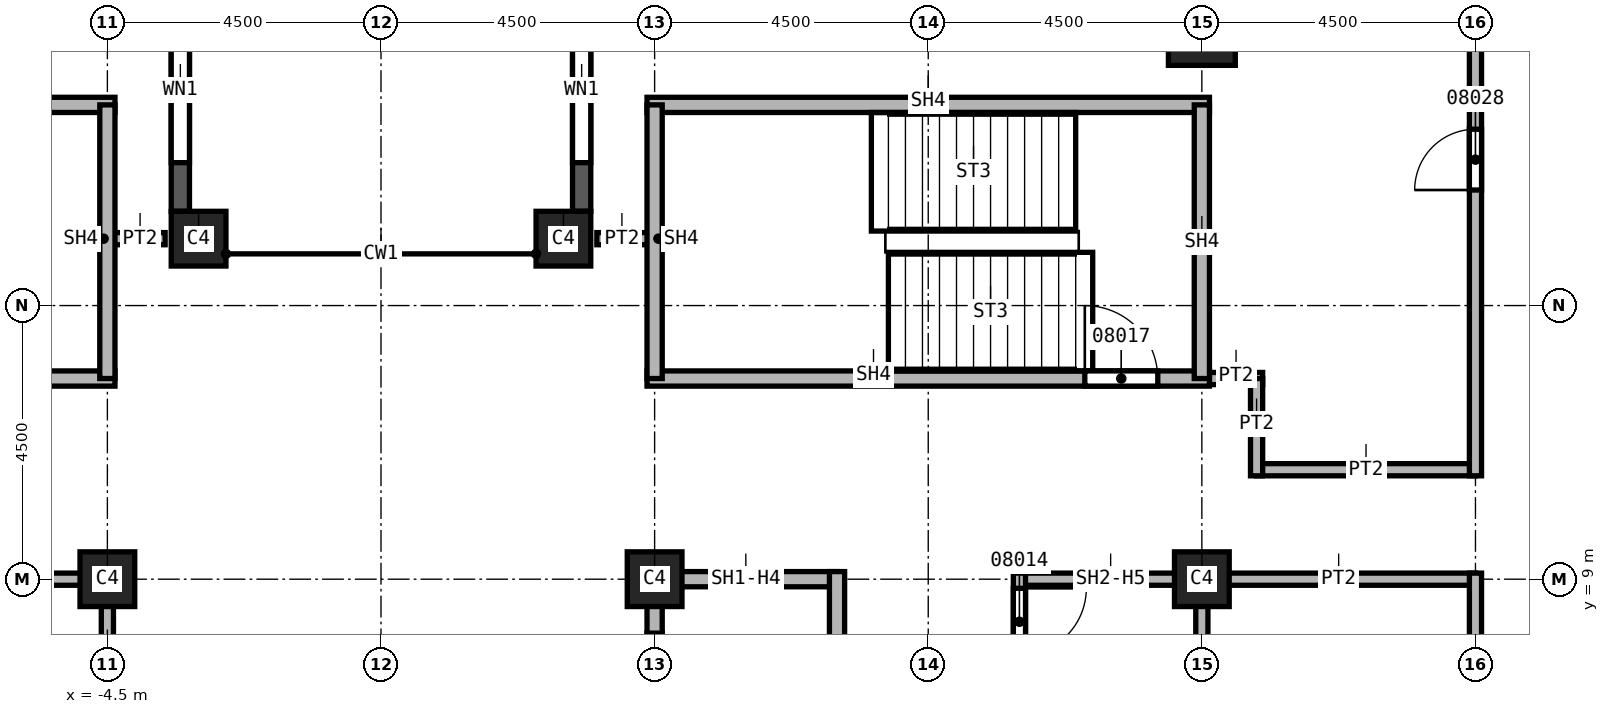
"""IFC4 building model, lengths in metres.
Left out: names, types, materials, properties, quantities, classifications, styles, units other than length and angle.
Written with IfcOpenShell. Run it as: python <this file> out.ifc"""

import sys

from ifc_helpers import new_model, si_unit, direction, frame, frame_2d, origin, origin_2d, place, context, subcontext, project, spatial, rectangle, extrude, element, fill, save


model = new_model("IFC4")
c1 = context("Model", 3, precision=1e-05, world=origin(), true_north=direction((0.0, 1.0)))
c2 = subcontext(c1, "Body", "Model", "MODEL_VIEW")
j1 = project(units=[si_unit("LENGTHUNIT", "METRE"), si_unit("PLANEANGLEUNIT", "RADIAN")], contexts=[c1])
p1 = place(None, origin())
s1 = spatial("IfcSite", under=j1, at=p1, CompositionType="ELEMENT")
p2 = place(p1, origin())
s2 = spatial("IfcBuilding", under=s1, at=p2, CompositionType="ELEMENT")
p3 = place(p2, frame((0.0, 0.0, 150.0)))
s3 = spatial("IfcBuildingStorey", under=s2, at=p3, CompositionType="ELEMENT", Elevation=150.0)
p4 = place(p3, frame((13.5, 18.0, 0.0), z_axis=(0.0, 0.0, 1.0), x_axis=(1.0, 0.0, 0.0)))
e1 = element("IfcColumn", 1, at=p4, inside=s3, PredefinedType="COLUMN", context=c2, shape_type="SweptSolid", body=[
    extrude(rectangle(XDim=1.1, YDim=1.1, at=origin_2d()), origin(), (0.0, 0.0, 1.0), 3.7),
])
for number, where, z_axis, x_axis in (
    (2, (4.5, 9.0, 0.0), (0.0, 0.0, 1.0), (1.0, 0.0, 0.0)),
    (3, (13.5, 9.0, 0.0), (0.0, 0.0, 1.0), (1.0, 0.0, 0.0)),
    (4, (-4.5, 9.0, 0.0), (0.0, 0.0, 1.0), (1.0, 0.0, 0.0)),
    (5, (3.0, 14.6, 0.0), (0.0, 0.0, 1.0), (1.0, 0.0, 0.0)),
    (6, (-3.0, 14.6, 0.0), (0.0, 0.0, 1.0), (1.0, 0.0, 0.0)),
):
    element("IfcColumn", number, at=place(p3, frame(where, z_axis=z_axis, x_axis=x_axis)), inside=s3, PredefinedType="COLUMN", context=c2, shape_type="SweptSolid", body=[
        extrude(rectangle(XDim=0.9, YDim=0.9, at=origin_2d()), origin(), (0.0, 0.0, 1.0), 3.7),
    ])
p5 = place(p3, frame((3.3, 23.05, 0.0), z_axis=(0.0, 0.0, 1.0), x_axis=(0.0, -1.0, 0.0)))
e7 = element("IfcWall", 7, at=p5, inside=s3, PredefinedType="SOLIDWALL", context=c2, shape_type="SweptSolid", body=[
    extrude(rectangle(XDim=8.0, YDim=0.3, at=frame_2d((4.0, 0.0))), origin(), (0.0, 0.0, 1.0), 3.1),
])
p6 = place(p5, frame((0.8, 0.0, 0.8)))
e8 = element("IfcOpeningElement", 8, at=p6, cuts=e7, PredefinedType="OPENING", context=c2, shape_type="SweptSolid", body=[
    extrude(rectangle(XDim=2.4, YDim=1.95, at=frame_2d((1.2, 0.975))), frame((0.0, 0.15, 0.0), z_axis=(0.0, -1.0, 0.0), x_axis=(1.0, 0.0, 0.0)), (0.0, 0.0, 1.0), 0.3),
])
p7 = place(p5, frame((4.8, 0.0, 0.8)))
e9 = element("IfcOpeningElement", 9, at=p7, cuts=e7, PredefinedType="OPENING", context=c2, shape_type="SweptSolid", body=[
    extrude(rectangle(XDim=2.4, YDim=1.95, at=frame_2d((1.2, 0.975))), frame((0.0, 0.15, 0.0), z_axis=(0.0, -1.0, 0.0), x_axis=(1.0, 0.0, 0.0)), (0.0, 0.0, 1.0), 0.3),
])
p8 = place(p3, frame((-3.3, 15.05, 0.0), z_axis=(0.0, 0.0, 1.0), x_axis=(0.0, 1.0, 0.0)))
e10 = element("IfcWall", 10, at=p8, inside=s3, PredefinedType="SOLIDWALL", context=c2, shape_type="SweptSolid", body=[
    extrude(rectangle(XDim=8.0, YDim=0.3, at=frame_2d((4.0, 0.0))), origin(), (0.0, 0.0, 1.0), 3.1),
])
p9 = place(p8, frame((0.8, 0.0, 0.8)))
e11 = element("IfcOpeningElement", 11, at=p9, cuts=e10, PredefinedType="OPENING", context=c2, shape_type="SweptSolid", body=[
    extrude(rectangle(XDim=2.4, YDim=1.95, at=frame_2d((1.2, 0.975))), frame((0.0, 0.15, 0.0), z_axis=(0.0, -1.0, 0.0), x_axis=(1.0, 0.0, 0.0)), (0.0, 0.0, 1.0), 0.3),
])
p10 = place(p8, frame((4.8, 0.0, 0.8)))
e12 = element("IfcOpeningElement", 12, at=p10, cuts=e10, PredefinedType="OPENING", context=c2, shape_type="SweptSolid", body=[
    extrude(rectangle(XDim=2.4, YDim=1.95, at=frame_2d((1.2, 0.975))), frame((0.0, 0.15, 0.0), z_axis=(0.0, -1.0, 0.0), x_axis=(1.0, 0.0, 0.0)), (0.0, 0.0, 1.0), 0.3),
])
for number, where, z_axis, x_axis in (
    (13, (-4.5, 14.6, 0.0), (0.0, 0.0, 1.0), (1.0, 0.0, 0.0)),
    (14, (3.55, 14.6, 0.0), (0.0, 0.0, 1.0), (1.0, 0.0, 0.0)),
):
    element("IfcWall", number, at=place(p3, frame(where, z_axis=z_axis, x_axis=x_axis)), inside=s3, PredefinedType="PARTITIONING", context=c2, shape_type="SweptSolid", body=[
        extrude(rectangle(XDim=0.95, YDim=0.2, at=frame_2d((0.475, 0.0))), origin(), (0.0, 0.0, 1.0), 3.7),
    ])
p11 = place(p3, frame((13.375, 12.3, 0.0), z_axis=(0.0, 0.0, 1.0), x_axis=(1.0, 0.0, 0.0)))
e15 = element("IfcWall", 15, at=p11, inside=s3, PredefinedType="PARTITIONING", context=c2, shape_type="SweptSolid", body=[
    extrude(rectangle(XDim=1.125, YDim=0.2, at=frame_2d((0.562, 0.0))), origin(), (0.0, 0.0, 1.0), 3.7),
])
p12 = place(p3, frame((18.0, 9.0, 0.0), z_axis=(0.0, 0.0, 1.0), x_axis=(-1.0, 0.0, 0.0)))
e16 = element("IfcWall", 16, at=p12, inside=s3, PredefinedType="PARTITIONING", context=c2, shape_type="SweptSolid", body=[
    extrude(rectangle(XDim=4.5, YDim=0.2, at=frame_2d((2.25, 0.0))), origin(), (0.0, 0.0, 1.0), 3.7),
])
p13 = place(p3, frame((14.4, 10.8, 0.0), z_axis=(0.0, 0.0, 1.0), x_axis=(1.0, 0.0, 0.0)))
e17 = element("IfcWall", 17, at=p13, inside=s3, PredefinedType="PARTITIONING", context=c2, shape_type="SweptSolid", body=[
    extrude(rectangle(XDim=3.6, YDim=0.2, at=frame_2d((1.8, 0.0))), origin(), (0.0, 0.0, 1.0), 3.7),
])
p14 = place(p3, frame((14.4, 12.3, 0.0), z_axis=(0.0, 0.0, 1.0), x_axis=(0.0, -1.0, 0.0)))
e18 = element("IfcWall", 18, at=p14, inside=s3, PredefinedType="PARTITIONING", context=c2, shape_type="SweptSolid", body=[
    extrude(rectangle(XDim=1.6, YDim=0.2, at=frame_2d((0.8, 0.0))), origin(), (0.0, 0.0, 1.0), 3.7),
])
p15 = place(p3, frame((18.0, -9.1, 0.0), z_axis=(0.0, 0.0, 1.0), x_axis=(0.0, 1.0, 0.0)))
e19 = element("IfcWall", 19, at=p15, inside=s3, PredefinedType="PARTITIONING", context=c2, shape_type="SweptSolid", body=[
    extrude(rectangle(XDim=18.2, YDim=0.2, at=frame_2d((9.1, 0.0))), origin(), (0.0, 0.0, 1.0), 3.7),
])
p16 = place(p15, frame((6.1, 0.0, 0.0)))
e20 = element("IfcOpeningElement", 20, at=p16, cuts=e19, PredefinedType="OPENING", context=c2, shape_type="SweptSolid", body=[
    extrude(rectangle(XDim=1.0, YDim=2.1, at=frame_2d((0.5, 1.05))), frame((0.0, 0.1, 0.0), z_axis=(0.0, -1.0, 0.0), x_axis=(1.0, 0.0, 0.0)), (0.0, 0.0, 1.0), 0.2),
])
p17 = place(p15, frame((14.2, 0.0, 0.0)))
e21 = element("IfcOpeningElement", 21, at=p17, cuts=e19, PredefinedType="OPENING", context=c2, shape_type="SweptSolid", body=[
    extrude(rectangle(XDim=1.0, YDim=2.1, at=frame_2d((0.5, 1.05))), frame((0.0, 0.1, 0.0), z_axis=(0.0, -1.0, 0.0), x_axis=(1.0, 0.0, 0.0)), (0.0, 0.0, 1.0), 0.2),
])
p18 = place(p3, frame((18.0, 10.7, 0.0), z_axis=(0.0, 0.0, 1.0), x_axis=(0.0, 1.0, 0.0)))
e22 = element("IfcWall", 22, at=p18, inside=s3, PredefinedType="PARTITIONING", context=c2, shape_type="SweptSolid", body=[
    extrude(rectangle(XDim=12.35, YDim=0.2, at=frame_2d((6.175, 0.0))), origin(), (0.0, 0.0, 1.0), 3.7),
])
p19 = place(p18, frame((4.7, 0.0, 0.0)))
e23 = element("IfcOpeningElement", 23, at=p19, cuts=e22, PredefinedType="OPENING", context=c2, shape_type="SweptSolid", body=[
    extrude(rectangle(XDim=1.0, YDim=2.1, at=frame_2d((0.5, 1.05))), frame((0.0, 0.1, 0.0), z_axis=(0.0, -1.0, 0.0), x_axis=(1.0, 0.0, 0.0)), (0.0, 0.0, 1.0), 0.2),
])
p20 = place(p3, frame((-7.5, 9.0, 0.0), z_axis=(0.0, 0.0, 1.0), x_axis=(1.0, 0.0, 0.0)))
e24 = element("IfcWall", 24, at=p20, inside=s3, PredefinedType="SOLIDWALL", context=c2, shape_type="SweptSolid", body=[
    extrude(rectangle(XDim=3.0, YDim=0.2, at=frame_2d((1.5, 0.0))), origin(), (0.0, 0.0, 1.0), 2.938),
])
p21 = place(p3, frame((-4.5, 9.1, 0.0), z_axis=(0.0, 0.0, 1.0), x_axis=(0.0, -1.0, 0.0)))
e25 = element("IfcWall", 25, at=p21, inside=s3, PredefinedType="SOLIDWALL", context=c2, shape_type="SweptSolid", body=[
    extrude(rectangle(XDim=9.1, YDim=0.2, at=frame_2d((4.55, 0.0))), origin(), (0.0, 0.0, 1.0), 2.938),
])
p22 = place(p21, frame((7.25, 0.0, 0.0)))
e26 = element("IfcOpeningElement", 26, at=p22, cuts=e25, PredefinedType="OPENING", context=c2, shape_type="SweptSolid", body=[
    extrude(rectangle(XDim=1.1, YDim=2.1, at=frame_2d((0.55, 1.05))), frame((0.0, 0.1, 0.0), z_axis=(0.0, -1.0, 0.0), x_axis=(1.0, 0.0, 0.0)), (0.0, 0.0, 1.0), 0.2),
])
p23 = place(p21, frame((2.5, 0.0, 0.0)))
e27 = element("IfcOpeningElement", 27, at=p23, cuts=e25, PredefinedType="OPENING", context=c2, shape_type="SweptSolid", body=[
    extrude(rectangle(XDim=1.1, YDim=2.1, at=frame_2d((0.55, 1.05))), frame((0.0, 0.1, 0.0), z_axis=(0.0, -1.0, 0.0), x_axis=(1.0, 0.0, 0.0)), (0.0, 0.0, 1.0), 0.2),
])
p24 = place(p3, frame((10.5, 9.0, 0.0), z_axis=(0.0, 0.0, 1.0), x_axis=(1.0, 0.0, 0.0)))
e28 = element("IfcWall", 28, at=p24, inside=s3, PredefinedType="SOLIDWALL", context=c2, shape_type="SweptSolid", body=[
    extrude(rectangle(XDim=3.1, YDim=0.2, at=frame_2d((1.55, 0.0))), origin(), (0.0, 0.0, 1.0), 2.938),
])
p25 = place(p3, frame((10.5, 9.1, 0.0), z_axis=(0.0, 0.0, 1.0), x_axis=(0.0, -1.0, 0.0)))
e29 = element("IfcWall", 29, at=p25, inside=s3, PredefinedType="SOLIDWALL", context=c2, shape_type="SweptSolid", body=[
    extrude(rectangle(XDim=3.225, YDim=0.2, at=frame_2d((1.613, 0.0))), origin(), (0.0, 0.0, 1.0), 3.7),
])
p26 = place(p25, frame((0.25, 0.0, 0.0)))
e30 = element("IfcOpeningElement", 30, at=p26, cuts=e29, PredefinedType="OPENING", context=c2, shape_type="SweptSolid", body=[
    extrude(rectangle(XDim=1.1, YDim=2.1, at=frame_2d((0.55, 1.05))), frame((0.0, 0.1, 0.0), z_axis=(0.0, -1.0, 0.0), x_axis=(1.0, 0.0, 0.0)), (0.0, 0.0, 1.0), 0.2),
])
p27 = place(p3, frame((13.5, 9.1, 0.0), z_axis=(0.0, 0.0, 1.0), x_axis=(0.0, -1.0, 0.0)))
e31 = element("IfcWall", 31, at=p27, inside=s3, PredefinedType="SOLIDWALL", context=c2, shape_type="SweptSolid", body=[
    extrude(rectangle(XDim=3.1, YDim=0.2, at=frame_2d((1.55, 0.0))), origin(), (0.0, 0.0, 1.0), 2.938),
])
p28 = place(p3, frame((4.5, 0.0, 0.0), z_axis=(0.0, 0.0, 1.0), x_axis=(0.0, 1.0, 0.0)))
e32 = element("IfcWall", 32, at=p28, inside=s3, PredefinedType="SOLIDWALL", context=c2, shape_type="SweptSolid", body=[
    extrude(rectangle(XDim=9.125, YDim=0.25, at=frame_2d((4.562, 0.0))), origin(), (0.0, 0.0, 1.0), 2.938),
])
p29 = place(p28, frame((0.95, 0.0, 0.0)))
e33 = element("IfcOpeningElement", 33, at=p29, cuts=e32, PredefinedType="OPENING", context=c2, shape_type="SweptSolid", body=[
    extrude(rectangle(XDim=1.1, YDim=2.1, at=frame_2d((0.55, 1.05))), frame((0.0, 0.125, 0.0), z_axis=(0.0, -1.0, 0.0), x_axis=(1.0, 0.0, 0.0)), (0.0, 0.0, 1.0), 0.25),
])
p30 = place(p28, frame((3.95, 0.0, 0.0)))
e34 = element("IfcOpeningElement", 34, at=p30, cuts=e32, PredefinedType="OPENING", context=c2, shape_type="SweptSolid", body=[
    extrude(rectangle(XDim=1.1, YDim=2.1, at=frame_2d((0.55, 1.05))), frame((0.0, 0.125, 0.0), z_axis=(0.0, -1.0, 0.0), x_axis=(1.0, 0.0, 0.0)), (0.0, 0.0, 1.0), 0.25),
])
p31 = place(p28, frame((7.012, 0.0, 0.0)))
e35 = element("IfcOpeningElement", 35, at=p31, cuts=e32, PredefinedType="OPENING", context=c2, shape_type="SweptSolid", body=[
    extrude(rectangle(XDim=1.1, YDim=2.1, at=frame_2d((0.55, 1.05))), frame((0.0, 0.125, 0.0), z_axis=(0.0, -1.0, 0.0), x_axis=(1.0, 0.0, 0.0)), (0.0, 0.0, 1.0), 0.25),
])
p32 = place(p3, frame((4.5, 9.0, 0.0), z_axis=(0.0, 0.0, 1.0), x_axis=(1.0, 0.0, 0.0)))
e36 = element("IfcWall", 36, at=p32, inside=s3, PredefinedType="SOLIDWALL", context=c2, shape_type="SweptSolid", body=[
    extrude(rectangle(XDim=3.0, YDim=0.25, at=frame_2d((1.5, 0.0))), origin(), (0.0, 0.0, 1.0), 2.938),
])
p33 = place(p3, frame((7.5, 9.125, 0.0), z_axis=(0.0, 0.0, 1.0), x_axis=(0.0, -1.0, 0.0)))
e37 = element("IfcWall", 37, at=p33, inside=s3, PredefinedType="SOLIDWALL", context=c2, shape_type="SweptSolid", body=[
    extrude(rectangle(XDim=12.25, YDim=0.25, at=frame_2d((6.125, 0.0))), origin(), (0.0, 0.0, 1.0), 3.7),
])
p34 = place(p3, frame((-13.625, 12.3, 0.0), z_axis=(0.0, 0.0, 1.0), x_axis=(1.0, 0.0, 0.0)))
e38 = element("IfcWall", 38, at=p34, inside=s3, PredefinedType="SOLIDWALL", context=c2, shape_type="SweptSolid", body=[
    extrude(rectangle(XDim=9.25, YDim=0.25, at=frame_2d((4.625, 0.0))), origin(), (0.0, 0.0, 1.0), 3.7),
])
p35 = place(p34, frame((0.85, 0.0, 0.0)))
e39 = element("IfcOpeningElement", 39, at=p35, cuts=e38, PredefinedType="OPENING", context=c2, shape_type="SweptSolid", body=[
    extrude(rectangle(XDim=1.2, YDim=2.1, at=frame_2d((0.6, 1.05))), frame((0.0, 0.125, 0.0), z_axis=(0.0, -1.0, 0.0), x_axis=(1.0, 0.0, 0.0)), (0.0, 0.0, 1.0), 0.25),
])
p36 = place(p3, frame((-13.625, 16.8, 0.0), z_axis=(0.0, 0.0, 1.0), x_axis=(1.0, 0.0, 0.0)))
e40 = element("IfcWall", 40, at=p36, inside=s3, PredefinedType="SOLIDWALL", context=c2, shape_type="SweptSolid", body=[
    extrude(rectangle(XDim=9.25, YDim=0.25, at=frame_2d((4.625, 0.0))), origin(), (0.0, 0.0, 1.0), 3.7),
])
p37 = place(p3, frame((-4.5, 16.8, 0.0), z_axis=(0.0, 0.0, 1.0), x_axis=(0.0, -1.0, 0.0)))
e41 = element("IfcWall", 41, at=p37, inside=s3, PredefinedType="SOLIDWALL", context=c2, shape_type="SweptSolid", body=[
    extrude(rectangle(XDim=4.5, YDim=0.25, at=frame_2d((2.25, 0.0))), origin(), (0.0, 0.0, 1.0), 3.7),
])
p38 = place(p3, frame((4.375, 12.3, 0.0), z_axis=(0.0, 0.0, 1.0), x_axis=(1.0, 0.0, 0.0)))
e42 = element("IfcWall", 42, at=p38, inside=s3, PredefinedType="SOLIDWALL", context=c2, shape_type="SweptSolid", body=[
    extrude(rectangle(XDim=9.25, YDim=0.25, at=frame_2d((4.625, 0.0))), origin(), (0.0, 0.0, 1.0), 3.7),
])
p39 = place(p38, frame((7.2, 0.0, 0.0)))
e43 = element("IfcOpeningElement", 43, at=p39, cuts=e42, PredefinedType="OPENING", context=c2, shape_type="SweptSolid", body=[
    extrude(rectangle(XDim=1.2, YDim=2.1, at=frame_2d((0.6, 1.05))), frame((0.0, 0.125, 0.0), z_axis=(0.0, -1.0, 0.0), x_axis=(1.0, 0.0, 0.0)), (0.0, 0.0, 1.0), 0.25),
])
p40 = place(p3, frame((4.375, 16.8, 0.0), z_axis=(0.0, 0.0, 1.0), x_axis=(1.0, 0.0, 0.0)))
e44 = element("IfcWall", 44, at=p40, inside=s3, PredefinedType="SOLIDWALL", context=c2, shape_type="SweptSolid", body=[
    extrude(rectangle(XDim=9.25, YDim=0.25, at=frame_2d((4.625, 0.0))), origin(), (0.0, 0.0, 1.0), 3.7),
])
for number, where, z_axis, x_axis in (
    (45, (4.5, 12.3, 0.0), (0.0, 0.0, 1.0), (0.0, 1.0, 0.0)),
    (46, (13.5, 16.8, 0.0), (0.0, 0.0, 1.0), (0.0, -1.0, 0.0)),
):
    element("IfcWall", number, at=place(p3, frame(where, z_axis=z_axis, x_axis=x_axis)), inside=s3, PredefinedType="SOLIDWALL", context=c2, shape_type="SweptSolid", body=[
        extrude(rectangle(XDim=4.5, YDim=0.25, at=frame_2d((2.25, 0.0))), origin(), (0.0, 0.0, 1.0), 3.7),
    ])
p41 = place(p7, origin())
e47 = element("IfcWindow", 47, at=p41, inside=s3, PartitioningType="SINGLE_PANEL", PredefinedType="WINDOW", context=c2, shape_type="SweptSolid", body=[
    extrude(rectangle(XDim=2.4, YDim=1.95, at=frame_2d((1.2, 0.975))), frame((0.0, 0.03, 0.0), z_axis=(0.0, -1.0, 0.0), x_axis=(1.0, 0.0, 0.0)), (0.0, 0.0, 1.0), 0.06),
])
fill(e9, e47)
p42 = place(p9, origin())
e48 = element("IfcWindow", 48, at=p42, inside=s3, PartitioningType="SINGLE_PANEL", PredefinedType="WINDOW", context=c2, shape_type="SweptSolid", body=[
    extrude(rectangle(XDim=2.4, YDim=1.95, at=frame_2d((1.2, 0.975))), frame((0.0, 0.03, 0.0), z_axis=(0.0, -1.0, 0.0), x_axis=(1.0, 0.0, 0.0)), (0.0, 0.0, 1.0), 0.06),
])
fill(e11, e48)
p43 = place(p26, origin())
e49 = element("IfcDoor", 49, at=p43, inside=s3, OperationType="SINGLE_SWING_LEFT", PredefinedType="DOOR", context=c2, shape_type="SweptSolid", body=[
    extrude(rectangle(XDim=1.1, YDim=2.1, at=frame_2d((0.55, 1.05))), frame((0.0, 0.025, 0.0), z_axis=(0.0, -1.0, 0.0), x_axis=(1.0, 0.0, 0.0)), (0.0, 0.0, 1.0), 0.05),
])
fill(e30, e49)
p44 = place(p39, origin())
e50 = element("IfcDoor", 50, at=p44, inside=s3, OperationType="SINGLE_SWING_RIGHT", PredefinedType="DOOR", context=c2, shape_type="SweptSolid", body=[
    extrude(rectangle(XDim=1.2, YDim=2.1, at=frame_2d((0.6, 1.05))), frame((0.0, 0.025, 0.0), z_axis=(0.0, -1.0, 0.0), x_axis=(1.0, 0.0, 0.0)), (0.0, 0.0, 1.0), 0.05),
])
fill(e43, e50)
p45 = place(p19, origin())
e51 = element("IfcDoor", 51, at=p45, inside=s3, OperationType="SINGLE_SWING_LEFT", PredefinedType="DOOR", context=c2, shape_type="SweptSolid", body=[
    extrude(rectangle(XDim=1.0, YDim=2.1, at=frame_2d((0.5, 1.05))), frame((0.0, 0.025, 0.0), z_axis=(0.0, -1.0, 0.0), x_axis=(1.0, 0.0, 0.0)), (0.0, 0.0, 1.0), 0.05),
])
fill(e23, e51)
p46 = place(p31, origin())
e52 = element("IfcDoor", 52, at=p46, inside=s3, OperationType="SLIDING_TO_LEFT", PredefinedType="DOOR", context=c2, shape_type="SweptSolid", body=[
    extrude(rectangle(XDim=1.1, YDim=2.1, at=frame_2d((0.55, 1.05))), frame((0.0, 0.025, 0.0), z_axis=(0.0, -1.0, 0.0), x_axis=(1.0, 0.0, 0.0)), (0.0, 0.0, 1.0), 0.05),
])
fill(e35, e52)
save(model, sys.argv[1])
